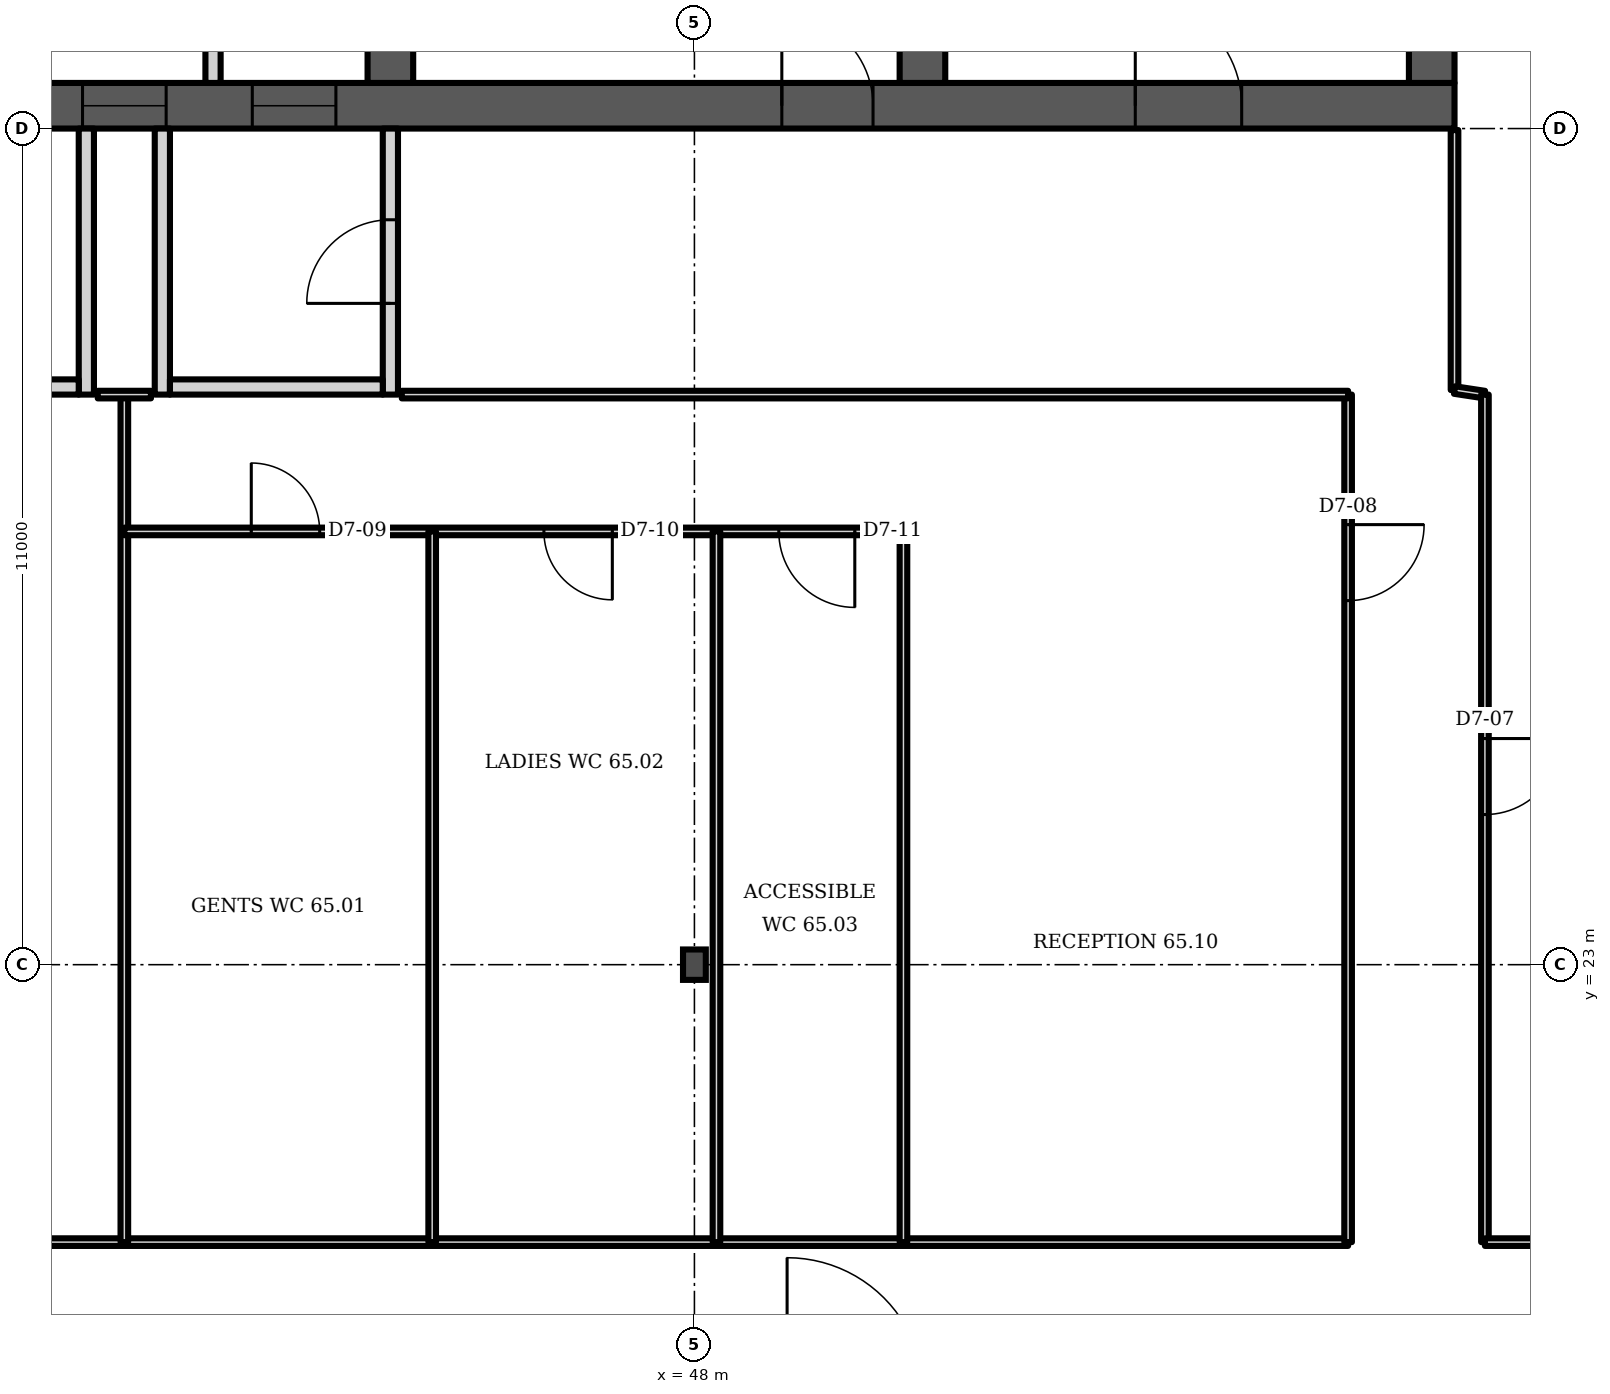
"""IFC4 building model, lengths in metres.
Left out: names, types, materials, properties, quantities, classifications, styles, units other than length and angle.
Written with IfcOpenShell. Run it as: python <this file> out.ifc"""

import sys

from ifc_helpers import new_model, si_unit, direction, frame, frame_2d, origin, origin_2d, place, context, subcontext, project, spatial, polyline, rectangle, i_section, outline, extrude, element, fill, save


model = new_model("IFC4")
c1 = context("Model", 3, precision=1e-05, world=origin(), true_north=direction((0.0, 1.0)))
c2 = subcontext(c1, "Body", "Model", "MODEL_VIEW")
j1 = project(units=[si_unit("LENGTHUNIT", "METRE"), si_unit("PLANEANGLEUNIT", "RADIAN")], contexts=[c1])
p1 = place(None, origin())
s1 = spatial("IfcSite", under=j1, at=p1, CompositionType="ELEMENT")
p2 = place(p1, origin())
s2 = spatial("IfcBuilding", under=s1, at=p2, CompositionType="ELEMENT")
p3 = place(p2, frame((0.0, 0.0, 257.5)))
s3 = spatial("IfcBuildingStorey", under=s2, at=p3, CompositionType="ELEMENT", Elevation=257.5)
p4 = place(p3, frame((23.0, 34.3, 0.0), z_axis=(0.0, 0.0, 1.0), x_axis=(1.0, 0.0, 0.0)))
e1 = element("IfcWall", 1, at=p4, inside=s3, PredefinedType="SHEAR", context=c2, shape_type="SweptSolid", body=[
    extrude(rectangle(XDim=35.0, YDim=0.6, at=frame_2d((17.5, 0.0))), origin(), (0.0, 0.0, 1.0), 3.6),
])
p5 = place(p4, frame((0.65, 0.0, 0.0)))
e2 = element("IfcOpeningElement", 2, at=p5, cuts=e1, PredefinedType="OPENING", context=c2, shape_type="SweptSolid", body=[
    extrude(rectangle(XDim=1.2, YDim=2.1, at=frame_2d((0.6, 1.05))), frame((0.0, 0.31, 0.0), z_axis=(0.0, -1.0, 0.0), x_axis=(1.0, 0.0, 0.0)), (0.0, 0.0, 1.0), 0.62),
])
p6 = place(p4, frame((7.717, 0.0, 0.0)))
e3 = element("IfcOpeningElement", 3, at=p6, cuts=e1, PredefinedType="OPENING", context=c2, shape_type="SweptSolid", body=[
    extrude(rectangle(XDim=1.1, YDim=2.1, at=frame_2d((0.55, 1.05))), frame((0.0, 0.31, 0.0), z_axis=(0.0, -1.0, 0.0), x_axis=(1.0, 0.0, 0.0)), (0.0, 0.0, 1.0), 0.62),
])
p7 = place(p4, frame((12.183, 0.0, 0.0)))
e4 = element("IfcOpeningElement", 4, at=p7, cuts=e1, PredefinedType="OPENING", context=c2, shape_type="SweptSolid", body=[
    extrude(rectangle(XDim=1.1, YDim=2.1, at=frame_2d((0.55, 1.05))), frame((0.0, 0.31, 0.0), z_axis=(0.0, -1.0, 0.0), x_axis=(1.0, 0.0, 0.0)), (0.0, 0.0, 1.0), 0.62),
])
p8 = place(p4, frame((9.8, 0.0, 0.0)))
e5 = element("IfcOpeningElement", 5, at=p8, cuts=e1, PredefinedType="OPENING", context=c2, shape_type="SweptSolid", body=[
    extrude(rectangle(XDim=1.4, YDim=2.1, at=frame_2d((0.7, 1.05))), frame((0.0, 0.31, 0.0), z_axis=(0.0, -1.0, 0.0), x_axis=(1.0, 0.0, 0.0)), (0.0, 0.0, 1.0), 0.62),
])
p9 = place(p4, frame((14.717, 0.0, 0.0)))
e6 = element("IfcOpeningElement", 6, at=p9, cuts=e1, PredefinedType="OPENING", context=c2, shape_type="SweptSolid", body=[
    extrude(rectangle(XDim=1.1, YDim=2.1, at=frame_2d((0.55, 1.05))), frame((0.0, 0.31, 0.0), z_axis=(0.0, -1.0, 0.0), x_axis=(1.0, 0.0, 0.0)), (0.0, 0.0, 1.0), 0.62),
])
p10 = place(p4, frame((16.95, 0.0, 0.0)))
e7 = element("IfcOpeningElement", 7, at=p10, cuts=e1, PredefinedType="OPENING", context=c2, shape_type="SweptSolid", body=[
    extrude(rectangle(XDim=1.1, YDim=2.1, at=frame_2d((0.55, 1.05))), frame((0.0, 0.31, 0.0), z_axis=(0.0, -1.0, 0.0), x_axis=(1.0, 0.0, 0.0)), (0.0, 0.0, 1.0), 0.62),
])
p11 = place(p4, frame((19.183, 0.0, 0.0)))
e8 = element("IfcOpeningElement", 8, at=p11, cuts=e1, PredefinedType="OPENING", context=c2, shape_type="SweptSolid", body=[
    extrude(rectangle(XDim=1.1, YDim=2.1, at=frame_2d((0.55, 1.05))), frame((0.0, 0.31, 0.0), z_axis=(0.0, -1.0, 0.0), x_axis=(1.0, 0.0, 0.0)), (0.0, 0.0, 1.0), 0.62),
])
p12 = place(p4, frame((26.15, 0.0, 0.0)))
e9 = element("IfcOpeningElement", 9, at=p12, cuts=e1, PredefinedType="OPENING", context=c2, shape_type="SweptSolid", body=[
    extrude(rectangle(XDim=1.2, YDim=2.1, at=frame_2d((0.6, 1.05))), frame((0.0, 0.31, 0.0), z_axis=(0.0, -1.0, 0.0), x_axis=(1.0, 0.0, 0.0)), (0.0, 0.0, 1.0), 0.62),
])
p13 = place(p4, frame((30.8, 0.0, 0.0)))
e10 = element("IfcOpeningElement", 10, at=p13, cuts=e1, PredefinedType="OPENING", context=c2, shape_type="SweptSolid", body=[
    extrude(rectangle(XDim=1.4, YDim=2.1, at=frame_2d((0.7, 1.05))), frame((0.0, 0.31, 0.0), z_axis=(0.0, -1.0, 0.0), x_axis=(1.0, 0.0, 0.0)), (0.0, 0.0, 1.0), 0.62),
])
p14 = place(p3, frame((44.0, 34.6, 0.0), z_axis=(0.0, 0.0, 1.0), x_axis=(0.0, 1.0, 0.0)))
e11 = element("IfcWall", 11, at=p14, inside=s3, PredefinedType="SHEAR", context=c2, shape_type="SweptSolid", body=[
    extrude(rectangle(XDim=14.784, YDim=0.6, at=frame_2d((7.392, 0.0))), origin(), (0.0, 0.0, 1.0), 3.6),
])
p15 = place(p14, frame((11.608, 0.0, 0.0)))
e12 = element("IfcOpeningElement", 12, at=p15, cuts=e11, PredefinedType="OPENING", context=c2, shape_type="SweptSolid", body=[
    extrude(rectangle(XDim=1.0, YDim=2.1, at=frame_2d((0.5, 1.05))), frame((0.0, 0.31, 0.0), z_axis=(0.0, -1.0, 0.0), x_axis=(1.0, 0.0, 0.0)), (0.0, 0.0, 1.0), 0.62),
])
p16 = place(p14, frame((3.8, 0.0, 0.0)))
e13 = element("IfcOpeningElement", 13, at=p16, cuts=e11, PredefinedType="OPENING", context=c2, shape_type="SweptSolid", body=[
    extrude(rectangle(XDim=1.1, YDim=2.1, at=frame_2d((0.55, 1.05))), frame((0.0, 0.31, 0.0), z_axis=(0.0, -1.0, 0.0), x_axis=(1.0, 0.0, 0.0)), (0.0, 0.0, 1.0), 0.62),
])
p17 = place(p3, frame((51.0, 34.6, 0.0), z_axis=(0.0, 0.0, 1.0), x_axis=(0.0, 1.0, 0.0)))
e14 = element("IfcWall", 14, at=p17, inside=s3, PredefinedType="SHEAR", context=c2, shape_type="SweptSolid", body=[
    extrude(rectangle(XDim=14.171, YDim=0.6, at=frame_2d((7.085, 0.0))), origin(), (0.0, 0.0, 1.0), 3.6),
])
p18 = place(p17, frame((3.8, 0.0, 0.0)))
e15 = element("IfcOpeningElement", 15, at=p18, cuts=e14, PredefinedType="OPENING", context=c2, shape_type="SweptSolid", body=[
    extrude(rectangle(XDim=1.1, YDim=2.1, at=frame_2d((0.55, 1.05))), frame((0.0, 0.31, 0.0), z_axis=(0.0, -1.0, 0.0), x_axis=(1.0, 0.0, 0.0)), (0.0, 0.0, 1.0), 0.62),
])
p19 = place(p3, frame((57.7, 34.6, 0.0), z_axis=(0.0, 0.0, 1.0), x_axis=(0.0, 1.0, 0.0)))
e16 = element("IfcWall", 16, at=p19, inside=s3, PredefinedType="SHEAR", context=c2, shape_type="SweptSolid", body=[
    extrude(rectangle(XDim=13.585, YDim=0.6, at=frame_2d((6.792, 0.0))), origin(), (0.0, 0.0, 1.0), 3.6),
])
p20 = place(p3, frame((48.0, 23.0, 0.0), z_axis=(0.0, 0.0, 1.0), x_axis=(1.0, 0.0, 0.0)))
e17 = element("IfcColumn", 17, at=p20, inside=s3, PredefinedType="COLUMN", context=c2, shape_type="SweptSolid", body=[
    extrude(i_section(OverallWidth=0.3, OverallDepth=0.4, WebThickness=0.013, FlangeThickness=0.024, FilletRadius=0.027, at=origin_2d()), origin(), (0.0, 0.0, 1.0), 3.6),
])
p21 = place(p3, frame((0.0, 0.0, -0.0)))
e18 = element("IfcWall", 18, at=p21, inside=s3, PredefinedType="PARTITIONING", context=c2, shape_type="SweptSolid", body=[
    extrude(outline(polyline([(41.567, 37.1), (39.433, 37.1), (39.433, 34.6), (39.233, 34.6), (39.233, 37.45), (37.3, 37.45), (37.3, 37.65), (39.233, 37.65), (39.433, 37.65), (39.433, 37.3), (41.567, 37.3), (41.567, 37.35), (41.767, 37.35), (43.7, 37.35), (43.7, 37.15), (41.767, 37.15), (41.767, 34.6), (41.567, 34.6), (41.567, 37.1)])), origin(), (0.0, 0.0, 1.0), 3.2),
])
p22 = place(p3, frame((40.0, 30.5, 0.0), z_axis=(0.0, 0.0, 1.0), x_axis=(0.0, 1.0, 0.0)))
e19 = element("IfcWall", 19, at=p22, inside=s3, PredefinedType="PARTITIONING", context=c2, shape_type="SweptSolid", body=[
    extrude(rectangle(XDim=3.5, YDim=0.2, at=frame_2d((1.75, 0.0))), origin(), (0.0, 0.0, 1.0), 3.2),
])
p23 = place(p3, frame((37.1, 30.6, 0.0), z_axis=(0.0, 0.0, 1.0), x_axis=(1.0, 0.0, 0.0)))
e20 = element("IfcWall", 20, at=p23, inside=s3, PredefinedType="PARTITIONING", context=c2, shape_type="SweptSolid", body=[
    extrude(rectangle(XDim=2.8, YDim=0.2, at=frame_2d((1.4, 0.0))), origin(), (0.0, 0.0, 1.0), 3.2),
])
p24 = place(p3, frame((41.0, 30.5, 0.0), z_axis=(0.0, 0.0, 1.0), x_axis=(0.0, 1.0, 0.0)))
e21 = element("IfcWall", 21, at=p24, inside=s3, PredefinedType="PARTITIONING", context=c2, shape_type="SweptSolid", body=[
    extrude(rectangle(XDim=3.5, YDim=0.2, at=frame_2d((1.75, 0.0))), origin(), (0.0, 0.0, 1.0), 3.2),
])
p25 = place(p3, frame((44.0, 30.5, 0.0), z_axis=(0.0, 0.0, 1.0), x_axis=(0.0, 1.0, 0.0)))
e22 = element("IfcWall", 22, at=p25, inside=s3, PredefinedType="PARTITIONING", context=c2, shape_type="SweptSolid", body=[
    extrude(rectangle(XDim=3.5, YDim=0.2, at=frame_2d((1.75, 0.0))), origin(), (0.0, 0.0, 1.0), 3.2),
])
p26 = place(p25, frame((1.2, 0.0, 0.0)))
e23 = element("IfcOpeningElement", 23, at=p26, cuts=e22, PredefinedType="OPENING", context=c2, shape_type="SweptSolid", body=[
    extrude(rectangle(XDim=1.1, YDim=2.1, at=frame_2d((0.55, 1.05))), frame((0.0, 0.11, 0.0), z_axis=(0.0, -1.0, 0.0), x_axis=(1.0, 0.0, 0.0)), (0.0, 0.0, 1.0), 0.22),
])
p27 = place(p3, frame((41.1, 30.6, 0.0), z_axis=(0.0, 0.0, 1.0), x_axis=(1.0, 0.0, 0.0)))
e24 = element("IfcWall", 24, at=p27, inside=s3, PredefinedType="PARTITIONING", context=c2, shape_type="SweptSolid", body=[
    extrude(rectangle(XDim=2.8, YDim=0.2, at=frame_2d((1.4, 0.0))), origin(), (0.0, 0.0, 1.0), 3.2),
])
p28 = place(p3, frame((25.125, 19.35, 0.0), z_axis=(0.0, 0.0, 1.0), x_axis=(1.0, 0.0, 0.0)))
e25 = element("IfcWall", 25, at=p28, inside=s3, PredefinedType="PARTITIONING", context=c2, shape_type="SweptSolid", body=[
    extrude(rectangle(XDim=31.475, YDim=0.1, at=frame_2d((15.738, 0.0))), origin(), (0.0, 0.0, 1.0), 3.2),
])
p29 = place(p3, frame((40.5, 19.35, 0.0), z_axis=(0.0, 0.0, 1.0), x_axis=(0.0, 1.0, 0.0)))
e26 = element("IfcWall", 26, at=p29, inside=s3, PredefinedType="PARTITIONING", context=c2, shape_type="SweptSolid", body=[
    extrude(rectangle(XDim=11.14, YDim=0.1, at=frame_2d((5.57, 0.0))), origin(), (0.0, 0.0, 1.0), 3.2),
])
p30 = place(p3, frame((40.5, 28.7, 0.0), z_axis=(0.0, 0.0, 1.0), x_axis=(1.0, 0.0, 0.0)))
e27 = element("IfcWall", 27, at=p30, inside=s3, PredefinedType="PARTITIONING", context=c2, shape_type="SweptSolid", body=[
    extrude(rectangle(XDim=10.25, YDim=0.1, at=frame_2d((5.125, 0.0))), origin(), (0.0, 0.0, 1.0), 3.2),
])
p31 = place(p30, frame((1.67, 0.0, 0.0)))
e28 = element("IfcOpeningElement", 28, at=p31, cuts=e27, PredefinedType="OPENING", context=c2, shape_type="SweptSolid", body=[
    extrude(rectangle(XDim=0.9, YDim=2.1, at=frame_2d((0.45, 1.05))), frame((0.0, 0.06, 0.0), z_axis=(0.0, -1.0, 0.0), x_axis=(1.0, 0.0, 0.0)), (0.0, 0.0, 1.0), 0.12),
])
p32 = place(p30, frame((5.52, 0.0, 0.0)))
e29 = element("IfcOpeningElement", 29, at=p32, cuts=e27, PredefinedType="OPENING", context=c2, shape_type="SweptSolid", body=[
    extrude(rectangle(XDim=0.9, YDim=2.1, at=frame_2d((0.45, 1.05))), frame((0.0, 0.06, 0.0), z_axis=(0.0, -1.0, 0.0), x_axis=(1.0, 0.0, 0.0)), (0.0, 0.0, 1.0), 0.12),
])
p33 = place(p30, frame((8.61, 0.0, 0.0)))
e30 = element("IfcOpeningElement", 30, at=p33, cuts=e27, PredefinedType="OPENING", context=c2, shape_type="SweptSolid", body=[
    extrude(rectangle(XDim=1.0, YDim=2.1, at=frame_2d((0.5, 1.05))), frame((0.0, 0.06, 0.0), z_axis=(0.0, -1.0, 0.0), x_axis=(1.0, 0.0, 0.0)), (0.0, 0.0, 1.0), 0.12),
])
for number, where, z_axis, x_axis in (
    (31, (44.55, 19.35, 0.0), (0.0, 0.0, 1.0), (0.0, 1.0, 0.0)),
    (32, (48.29, 19.35, 0.0), (0.0, 0.0, 1.0), (0.0, 1.0, 0.0)),
    (33, (50.75, 19.35, 0.0), (0.0, 0.0, 1.0), (0.0, 1.0, 0.0)),
):
    element("IfcWall", number, at=place(p3, frame(where, z_axis=z_axis, x_axis=x_axis)), inside=s3, PredefinedType="PARTITIONING", context=c2, shape_type="SweptSolid", body=[
        extrude(rectangle(XDim=9.35, YDim=0.1, at=frame_2d((4.675, 0.0))), origin(), (0.0, 0.0, 1.0), 3.2),
    ])
p34 = place(p3, frame((56.6, 19.35, 0.0), z_axis=(0.0, 0.0, 1.0), x_axis=(0.0, 1.0, 0.0)))
e34 = element("IfcWall", 34, at=p34, inside=s3, PredefinedType="PARTITIONING", context=c2, shape_type="SweptSolid", body=[
    extrude(rectangle(XDim=11.15, YDim=0.1, at=frame_2d((5.575, 0.0))), origin(), (0.0, 0.0, 1.0), 3.2),
])
p35 = place(p34, frame((8.439, 0.0, 0.0)))
e35 = element("IfcOpeningElement", 35, at=p35, cuts=e34, PredefinedType="OPENING", context=c2, shape_type="SweptSolid", body=[
    extrude(rectangle(XDim=1.0, YDim=2.1, at=frame_2d((0.5, 1.05))), frame((0.0, 0.06, 0.0), z_axis=(0.0, -1.0, 0.0), x_axis=(1.0, 0.0, 0.0)), (0.0, 0.0, 1.0), 0.12),
])
p36 = place(p3, frame((58.0, 30.56, 0.0), z_axis=(0.0, 0.0, 1.0), x_axis=(0.0, 1.0, 0.0)))
e36 = element("IfcWall", 36, at=p36, inside=s3, PredefinedType="PARTITIONING", context=c2, shape_type="SweptSolid", body=[
    extrude(rectangle(XDim=3.42, YDim=0.1, at=frame_2d((1.71, 0.0))), origin(), (0.0, 0.0, 1.0), 3.2),
])
p37 = place(p3, frame((58.395, 30.5, 0.0), z_axis=(0.0, 0.0, 1.0), x_axis=(-0.988637, 0.150312, 0.0)))
e37 = element("IfcWall", 37, at=p37, inside=s3, PredefinedType="PARTITIONING", context=c2, shape_type="SweptSolid", body=[
    extrude(rectangle(XDim=0.4, YDim=0.1, at=frame_2d((0.2, 0.0))), origin(), (0.0, 0.0, 1.0), 3.2),
])
p38 = place(p3, frame((58.4, 19.35, 0.0), z_axis=(0.0, 0.0, 1.0), x_axis=(0.0, 1.0, 0.0)))
e38 = element("IfcWall", 38, at=p38, inside=s3, PredefinedType="PARTITIONING", context=c2, shape_type="SweptSolid", body=[
    extrude(rectangle(XDim=11.15, YDim=0.1, at=frame_2d((5.575, 0.0))), origin(), (0.0, 0.0, 1.0), 3.2),
])
p39 = place(p38, frame((5.625, 0.0, 0.0)))
e39 = element("IfcOpeningElement", 39, at=p39, cuts=e38, PredefinedType="OPENING", context=c2, shape_type="SweptSolid", body=[
    extrude(rectangle(XDim=1.0, YDim=2.1, at=frame_2d((0.5, 1.05))), frame((0.0, 0.06, 0.0), z_axis=(0.0, -1.0, 0.0), x_axis=(1.0, 0.0, 0.0)), (0.0, 0.0, 1.0), 0.12),
])
p40 = place(p3, frame((58.4, 19.35, 0.0), z_axis=(0.0, 0.0, 1.0), x_axis=(1.0, 0.0, 0.0)))
e40 = element("IfcWall", 40, at=p40, inside=s3, PredefinedType="PARTITIONING", context=c2, shape_type="SweptSolid", body=[
    extrude(rectangle(XDim=6.67, YDim=0.1, at=frame_2d((3.335, 0.0))), origin(), (0.0, 0.0, 1.0), 3.2),
])
p41 = place(p3, frame((40.15, 30.5, 0.0), z_axis=(0.0, 0.0, 1.0), x_axis=(1.0, 0.0, 0.0)))
e41 = element("IfcWall", 41, at=p41, inside=s3, PredefinedType="PARTITIONING", context=c2, shape_type="SweptSolid", body=[
    extrude(rectangle(XDim=0.7, YDim=0.1, at=frame_2d((0.35, 0.0))), origin(), (0.0, 0.0, 1.0), 3.2),
])
p42 = place(p3, frame((44.15, 30.5, 0.0), z_axis=(0.0, 0.0, 1.0), x_axis=(1.0, 0.0, 0.0)))
e42 = element("IfcWall", 42, at=p42, inside=s3, PredefinedType="PARTITIONING", context=c2, shape_type="SweptSolid", body=[
    extrude(rectangle(XDim=12.45, YDim=0.1, at=frame_2d((6.225, 0.0))), origin(), (0.0, 0.0, 1.0), 3.2),
])
p43 = place(p10, origin())
e43 = element("IfcDoor", 43, at=p43, inside=s3, OperationType="DOUBLE_DOOR_SLIDING", PredefinedType="DOOR", context=c2, shape_type="SweptSolid", body=[
    extrude(rectangle(XDim=1.1, YDim=2.1, at=frame_2d((0.55, 1.05))), frame((0.0, 0.025, 0.0), z_axis=(0.0, -1.0, 0.0), x_axis=(1.0, 0.0, 0.0)), (0.0, 0.0, 1.0), 0.05),
])
fill(e7, e43)
p44 = place(p11, origin())
e44 = element("IfcDoor", 44, at=p44, inside=s3, OperationType="DOUBLE_DOOR_SLIDING", PredefinedType="DOOR", context=c2, shape_type="SweptSolid", body=[
    extrude(rectangle(XDim=1.1, YDim=2.1, at=frame_2d((0.55, 1.05))), frame((0.0, 0.025, 0.0), z_axis=(0.0, -1.0, 0.0), x_axis=(1.0, 0.0, 0.0)), (0.0, 0.0, 1.0), 0.05),
])
fill(e8, e44)
p45 = place(p12, origin())
e45 = element("IfcDoor", 45, at=p45, inside=s3, OperationType="SINGLE_SWING_LEFT", PredefinedType="DOOR", context=c2, shape_type="SweptSolid", body=[
    extrude(rectangle(XDim=1.2, YDim=2.1, at=frame_2d((0.6, 1.05))), frame((0.0, 0.025, 0.0), z_axis=(0.0, -1.0, 0.0), x_axis=(1.0, 0.0, 0.0)), (0.0, 0.0, 1.0), 0.05),
])
fill(e9, e45)
p46 = place(p13, origin())
e46 = element("IfcDoor", 46, at=p46, inside=s3, OperationType="DOUBLE_DOOR_SINGLE_SWING", PredefinedType="DOOR", context=c2, shape_type="SweptSolid", body=[
    extrude(rectangle(XDim=1.4, YDim=2.1, at=frame_2d((0.7, 1.05))), frame((0.0, 0.025, 0.0), z_axis=(0.0, -1.0, 0.0), x_axis=(1.0, 0.0, 0.0)), (0.0, 0.0, 1.0), 0.05),
])
fill(e10, e46)
p47 = place(p26, origin())
e47 = element("IfcDoor", 47, at=p47, inside=s3, OperationType="SINGLE_SWING_LEFT", PredefinedType="DOOR", context=c2, shape_type="SweptSolid", body=[
    extrude(rectangle(XDim=1.1, YDim=2.1, at=frame_2d((0.55, 1.05))), frame((0.0, 0.025, 0.0), z_axis=(0.0, -1.0, 0.0), x_axis=(1.0, 0.0, 0.0)), (0.0, 0.0, 1.0), 0.05),
])
fill(e23, e47)
p48 = place(p39, origin())
e48 = element("IfcDoor", 48, at=p48, inside=s3, OperationType="SINGLE_SWING_RIGHT", PredefinedType="DOOR", context=c2, shape_type="SweptSolid", body=[
    extrude(rectangle(XDim=1.0, YDim=2.1, at=frame_2d((0.5, 1.05))), frame((0.0, 0.025, 0.0), z_axis=(0.0, -1.0, 0.0), x_axis=(1.0, 0.0, 0.0)), (0.0, 0.0, 1.0), 0.05),
])
fill(e39, e48)
p49 = place(p35, origin())
e49 = element("IfcDoor", 49, at=p49, inside=s3, OperationType="SINGLE_SWING_RIGHT", PredefinedType="DOOR", context=c2, shape_type="SweptSolid", body=[
    extrude(rectangle(XDim=1.0, YDim=2.1, at=frame_2d((0.5, 1.05))), frame((0.0, 0.025, 0.0), z_axis=(0.0, -1.0, 0.0), x_axis=(1.0, 0.0, 0.0)), (0.0, 0.0, 1.0), 0.05),
])
fill(e35, e49)
p50 = place(p31, origin())
e50 = element("IfcDoor", 50, at=p50, inside=s3, OperationType="SINGLE_SWING_LEFT", PredefinedType="DOOR", context=c2, shape_type="SweptSolid", body=[
    extrude(rectangle(XDim=0.9, YDim=2.1, at=frame_2d((0.45, 1.05))), frame((0.0, 0.025, 0.0), z_axis=(0.0, -1.0, 0.0), x_axis=(1.0, 0.0, 0.0)), (0.0, 0.0, 1.0), 0.05),
])
fill(e28, e50)
p51 = place(p32, origin())
e51 = element("IfcDoor", 51, at=p51, inside=s3, OperationType="SINGLE_SWING_RIGHT", PredefinedType="DOOR", context=c2, shape_type="SweptSolid", body=[
    extrude(rectangle(XDim=0.9, YDim=2.1, at=frame_2d((0.45, 1.05))), frame((0.0, 0.025, 0.0), z_axis=(0.0, -1.0, 0.0), x_axis=(1.0, 0.0, 0.0)), (0.0, 0.0, 1.0), 0.05),
])
fill(e29, e51)
p52 = place(p33, origin())
e52 = element("IfcDoor", 52, at=p52, inside=s3, OperationType="SINGLE_SWING_RIGHT", PredefinedType="DOOR", context=c2, shape_type="SweptSolid", body=[
    extrude(rectangle(XDim=1.0, YDim=2.1, at=frame_2d((0.5, 1.05))), frame((0.0, 0.025, 0.0), z_axis=(0.0, -1.0, 0.0), x_axis=(1.0, 0.0, 0.0)), (0.0, 0.0, 1.0), 0.05),
])
fill(e30, e52)
save(model, sys.argv[1])
